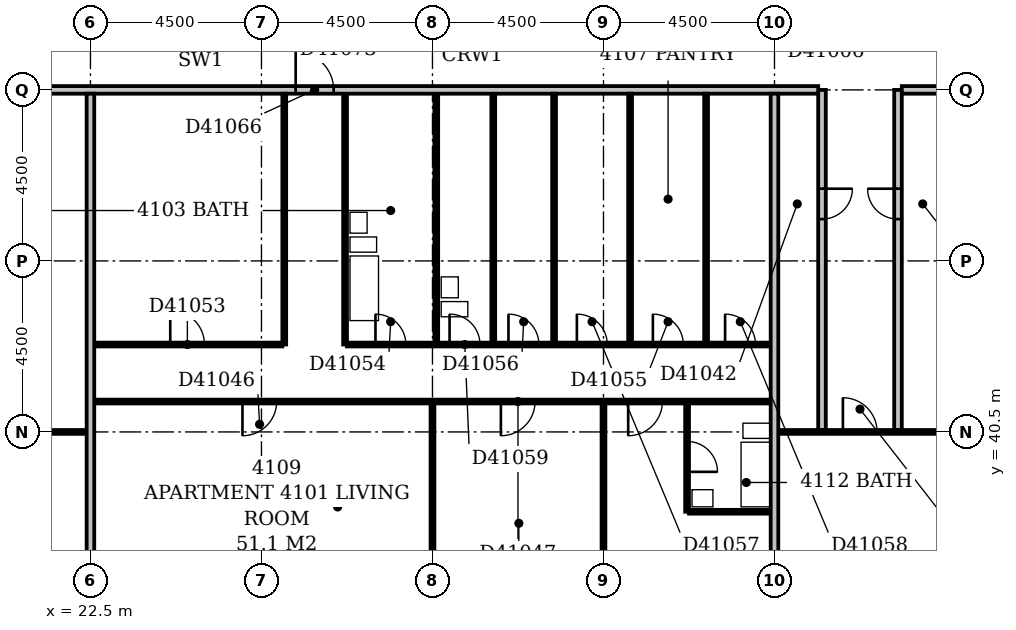
"""IFC4 building model, lengths in metres.
Left out: names, types, materials, properties, quantities, classifications, styles, units other than length and angle.
Written with IfcOpenShell. Run it as: python <this file> out.ifc"""

import sys

from ifc_helpers import new_model, si_unit, direction, frame, frame_2d, origin, place, context, subcontext, project, spatial, rectangle, extrude, element, fill, save


model = new_model("IFC4")
c1 = context("Model", 3, precision=1e-05, world=origin(), true_north=direction((0.0, 1.0)))
c2 = subcontext(c1, "Body", "Model", "MODEL_VIEW")
j1 = project(units=[si_unit("LENGTHUNIT", "METRE"), si_unit("PLANEANGLEUNIT", "RADIAN")], contexts=[c1])
p1 = place(None, origin())
s1 = spatial("IfcSite", under=j1, at=p1, CompositionType="ELEMENT")
p2 = place(p1, origin())
s2 = spatial("IfcBuilding", under=s1, at=p2, CompositionType="ELEMENT")
p3 = place(p2, frame((0.0, 0.0, 162.8)))
s3 = spatial("IfcBuildingStorey", under=s2, at=p3, CompositionType="ELEMENT", Elevation=162.8)
p4 = place(p3, frame((22.5, 36.5, 0.0), z_axis=(0.0, 0.0, 1.0), x_axis=(0.0, 1.0, 0.0)))
e1 = element("IfcWall", 1, at=p4, inside=s3, PredefinedType="PARTITIONING", context=c2, shape_type="SweptSolid", body=[
    extrude(rectangle(XDim=12.9, YDim=0.2, at=frame_2d((6.45, 0.0))), origin(), (0.0, 0.0, 1.0), 3.3),
])
p5 = place(p3, frame((31.5, 36.5, 0.0), z_axis=(0.0, 0.0, 1.0), x_axis=(0.0, 1.0, 0.0)))
e2 = element("IfcWall", 2, at=p5, inside=s3, PredefinedType="PARTITIONING", context=c2, shape_type="SweptSolid", body=[
    extrude(rectangle(XDim=4.75, YDim=0.1, at=frame_2d((2.375, 0.0))), origin(), (0.0, 0.0, 1.0), 3.3),
])
p6 = place(p3, frame((36.0, 36.5, 0.0), z_axis=(0.0, 0.0, 1.0), x_axis=(0.0, 1.0, 0.0)))
e3 = element("IfcWall", 3, at=p6, inside=s3, PredefinedType="PARTITIONING", context=c2, shape_type="SweptSolid", body=[
    extrude(rectangle(XDim=4.75, YDim=0.1, at=frame_2d((2.375, 0.0))), origin(), (0.0, 0.0, 1.0), 2.4),
])
p7 = place(p3, frame((40.5, 36.5, 0.0), z_axis=(0.0, 0.0, 1.0), x_axis=(0.0, 1.0, 0.0)))
e4 = element("IfcWall", 4, at=p7, inside=s3, PredefinedType="PARTITIONING", context=c2, shape_type="SweptSolid", body=[
    extrude(rectangle(XDim=12.9, YDim=0.2, at=frame_2d((6.45, 0.0))), origin(), (0.0, 0.0, 1.0), 3.3),
])
p8 = place(p3, frame((38.2, 38.4, 0.0), z_axis=(0.0, 0.0, 1.0), x_axis=(0.0, 1.0, 0.0)))
e5 = element("IfcWall", 5, at=p8, inside=s3, PredefinedType="PLUMBINGWALL", context=c2, shape_type="SweptSolid", body=[
    extrude(rectangle(XDim=2.85, YDim=0.1, at=frame_2d((1.425, 0.0))), origin(), (0.0, 0.0, 1.0), 3.3),
])
p9 = place(p8, frame((1.05, 0.0, 0.0)))
e6 = element("IfcOpeningElement", 6, at=p9, cuts=e5, PredefinedType="OPENING", context=c2, shape_type="SweptSolid", body=[
    extrude(rectangle(XDim=0.8, YDim=2.1, at=frame_2d((0.4, 1.05))), frame((0.0, 0.062, 0.0), z_axis=(0.0, -1.0, 0.0), x_axis=(1.0, 0.0, 0.0)), (0.0, 0.0, 1.0), 0.124),
])
p10 = place(p3, frame((38.25, 38.4, 0.0), z_axis=(0.0, 0.0, 1.0), x_axis=(1.0, 0.0, 0.0)))
e7 = element("IfcWall", 7, at=p10, inside=s3, PredefinedType="PLUMBINGWALL", context=c2, shape_type="SweptSolid", body=[
    extrude(rectangle(XDim=2.15, YDim=0.1, at=frame_2d((1.075, 0.0))), origin(), (0.0, 0.0, 1.0), 3.3),
])
p11 = place(p3, frame((9.1, 40.5, 0.0), z_axis=(0.0, 0.0, 1.0), x_axis=(1.0, 0.0, 0.0)))
e8 = element("IfcWall", 8, at=p11, inside=s3, PredefinedType="PARTITIONING", context=c2, shape_type="SweptSolid", body=[
    extrude(rectangle(XDim=13.3, YDim=0.1, at=frame_2d((6.65, 0.0))), origin(), (0.0, 0.0, 1.0), 3.3),
])
p12 = place(p3, frame((40.6, 40.5, 0.0), z_axis=(0.0, 0.0, 1.0), x_axis=(1.0, 0.0, 0.0)))
e9 = element("IfcWall", 9, at=p12, inside=s3, PredefinedType="PARTITIONING", context=c2, shape_type="SweptSolid", body=[
    extrude(rectangle(XDim=4.3, YDim=0.1, at=frame_2d((2.15, 0.0))), origin(), (0.0, 0.0, 1.0), 3.3),
])
p13 = place(p12, frame((1.7, 0.0, 0.0)))
e10 = element("IfcOpeningElement", 10, at=p13, cuts=e9, PredefinedType="OPENING", context=c2, shape_type="SweptSolid", body=[
    extrude(rectangle(XDim=0.9, YDim=2.1, at=frame_2d((0.45, 1.05))), frame((0.0, 0.062, 0.0), z_axis=(0.0, -1.0, 0.0), x_axis=(1.0, 0.0, 0.0)), (0.0, 0.0, 1.0), 0.124),
])
p14 = place(p3, frame((41.75, 40.55, 0.0), z_axis=(0.0, 0.0, 1.0), x_axis=(0.0, 1.0, 0.0)))
e11 = element("IfcWall", 11, at=p14, inside=s3, PredefinedType="PARTITIONING", context=c2, shape_type="SweptSolid", body=[
    extrude(rectangle(XDim=8.95, YDim=0.2, at=frame_2d((4.475, 0.0))), origin(), (0.0, 0.0, 1.0), 3.3),
])
p15 = place(p14, frame((5.55, 0.0, 0.0)))
e12 = element("IfcOpeningElement", 12, at=p15, cuts=e11, PredefinedType="OPENING", context=c2, shape_type="SweptSolid", body=[
    extrude(rectangle(XDim=0.8, YDim=2.1, at=frame_2d((0.4, 1.05))), frame((0.0, 0.112, 0.0), z_axis=(0.0, -1.0, 0.0), x_axis=(1.0, 0.0, 0.0)), (0.0, 0.0, 1.0), 0.224),
])
p16 = place(p3, frame((43.75, 40.55, 0.0), z_axis=(0.0, 0.0, 1.0), x_axis=(0.0, 1.0, 0.0)))
e13 = element("IfcWall", 13, at=p16, inside=s3, PredefinedType="PARTITIONING", context=c2, shape_type="SweptSolid", body=[
    extrude(rectangle(XDim=8.95, YDim=0.2, at=frame_2d((4.475, 0.0))), origin(), (0.0, 0.0, 1.0), 3.3),
])
p17 = place(p16, frame((5.55, 0.0, 0.0)))
e14 = element("IfcOpeningElement", 14, at=p17, cuts=e13, PredefinedType="OPENING", context=c2, shape_type="SweptSolid", body=[
    extrude(rectangle(XDim=0.8, YDim=2.1, at=frame_2d((0.4, 1.05))), frame((0.0, 0.112, 0.0), z_axis=(0.0, -1.0, 0.0), x_axis=(1.0, 0.0, 0.0)), (0.0, 0.0, 1.0), 0.224),
])
p18 = place(p3, frame((22.6, 41.3, 0.0), z_axis=(0.0, 0.0, 1.0), x_axis=(1.0, 0.0, 0.0)))
e15 = element("IfcWall", 15, at=p18, inside=s3, PredefinedType="PARTITIONING", context=c2, shape_type="SweptSolid", body=[
    extrude(rectangle(XDim=17.8, YDim=0.1, at=frame_2d((8.9, 0.0))), origin(), (0.0, 0.0, 1.0), 3.3),
])
p19 = place(p18, frame((3.9, 0.0, 0.0)))
e16 = element("IfcOpeningElement", 16, at=p19, cuts=e15, PredefinedType="OPENING", context=c2, shape_type="SweptSolid", body=[
    extrude(rectangle(XDim=0.9, YDim=2.1, at=frame_2d((0.45, 1.05))), frame((0.0, 0.062, 0.0), z_axis=(0.0, -1.0, 0.0), x_axis=(1.0, 0.0, 0.0)), (0.0, 0.0, 1.0), 0.124),
])
p20 = place(p18, frame((10.7, 0.0, 0.0)))
e17 = element("IfcOpeningElement", 17, at=p20, cuts=e15, PredefinedType="OPENING", context=c2, shape_type="SweptSolid", body=[
    extrude(rectangle(XDim=0.9, YDim=2.1, at=frame_2d((0.45, 1.05))), frame((0.0, 0.062, 0.0), z_axis=(0.0, -1.0, 0.0), x_axis=(1.0, 0.0, 0.0)), (0.0, 0.0, 1.0), 0.124),
])
p21 = place(p18, frame((14.05, 0.0, 0.0)))
e18 = element("IfcOpeningElement", 18, at=p21, cuts=e15, PredefinedType="OPENING", context=c2, shape_type="SweptSolid", body=[
    extrude(rectangle(XDim=0.9, YDim=2.1, at=frame_2d((0.45, 1.05))), frame((0.0, 0.062, 0.0), z_axis=(0.0, -1.0, 0.0), x_axis=(1.0, 0.0, 0.0)), (0.0, 0.0, 1.0), 0.124),
])
p22 = place(p3, frame((22.6, 42.8, 0.0), z_axis=(0.0, 0.0, 1.0), x_axis=(1.0, 0.0, 0.0)))
e19 = element("IfcWall", 19, at=p22, inside=s3, PredefinedType="PARTITIONING", context=c2, shape_type="SweptSolid", body=[
    extrude(rectangle(XDim=4.95, YDim=0.1, at=frame_2d((2.475, 0.0))), origin(), (0.0, 0.0, 1.0), 3.3),
])
p23 = place(p22, frame((2.0, 0.0, 0.0)))
e20 = element("IfcOpeningElement", 20, at=p23, cuts=e19, PredefinedType="OPENING", context=c2, shape_type="SweptSolid", body=[
    extrude(rectangle(XDim=0.9, YDim=2.1, at=frame_2d((0.45, 1.05))), frame((0.0, 0.062, 0.0), z_axis=(0.0, -1.0, 0.0), x_axis=(1.0, 0.0, 0.0)), (0.0, 0.0, 1.0), 0.124),
])
p24 = place(p3, frame((27.6, 42.8, 0.0), z_axis=(0.0, 0.0, 1.0), x_axis=(0.0, 1.0, 0.0)))
e21 = element("IfcWall", 21, at=p24, inside=s3, PredefinedType="PARTITIONING", context=c2, shape_type="SweptSolid", body=[
    extrude(rectangle(XDim=6.6, YDim=0.1, at=frame_2d((3.3, 0.0))), origin(), (0.0, 0.0, 1.0), 2.6),
])
p25 = place(p3, frame((29.2, 42.8, 0.0), z_axis=(0.0, 0.0, 1.0), x_axis=(0.0, 1.0, 0.0)))
e22 = element("IfcWall", 22, at=p25, inside=s3, PredefinedType="PLUMBINGWALL", context=c2, shape_type="SweptSolid", body=[
    extrude(rectangle(XDim=6.6, YDim=0.1, at=frame_2d((3.3, 0.0))), origin(), (0.0, 0.0, 1.0), 3.3),
])
p26 = place(p3, frame((29.25, 42.8, 0.0), z_axis=(0.0, 0.0, 1.0), x_axis=(1.0, 0.0, 0.0)))
e23 = element("IfcWall", 23, at=p26, inside=s3, PredefinedType="PARTITIONING", context=c2, shape_type="SweptSolid", body=[
    extrude(rectangle(XDim=11.15, YDim=0.1, at=frame_2d((5.575, 0.0))), origin(), (0.0, 0.0, 1.0), 3.3),
])
p27 = place(p26, frame((0.75, 0.0, 0.0)))
e24 = element("IfcOpeningElement", 24, at=p27, cuts=e23, PredefinedType="OPENING", context=c2, shape_type="SweptSolid", body=[
    extrude(rectangle(XDim=0.8, YDim=2.1, at=frame_2d((0.4, 1.05))), frame((0.0, 0.062, 0.0), z_axis=(0.0, -1.0, 0.0), x_axis=(1.0, 0.0, 0.0)), (0.0, 0.0, 1.0), 0.124),
])
p28 = place(p26, frame((8.05, 0.0, 0.0)))
e25 = element("IfcOpeningElement", 25, at=p28, cuts=e23, PredefinedType="OPENING", context=c2, shape_type="SweptSolid", body=[
    extrude(rectangle(XDim=0.8, YDim=2.1, at=frame_2d((0.4, 1.05))), frame((0.0, 0.062, 0.0), z_axis=(0.0, -1.0, 0.0), x_axis=(1.0, 0.0, 0.0)), (0.0, 0.0, 1.0), 0.124),
])
p29 = place(p26, frame((4.25, 0.0, 0.0)))
e26 = element("IfcOpeningElement", 26, at=p29, cuts=e23, PredefinedType="OPENING", context=c2, shape_type="SweptSolid", body=[
    extrude(rectangle(XDim=0.8, YDim=2.1, at=frame_2d((0.4, 1.05))), frame((0.0, 0.062, 0.0), z_axis=(0.0, -1.0, 0.0), x_axis=(1.0, 0.0, 0.0)), (0.0, 0.0, 1.0), 0.124),
])
p30 = place(p26, frame((6.05, 0.0, 0.0)))
e27 = element("IfcOpeningElement", 27, at=p30, cuts=e23, PredefinedType="OPENING", context=c2, shape_type="SweptSolid", body=[
    extrude(rectangle(XDim=0.8, YDim=2.1, at=frame_2d((0.4, 1.05))), frame((0.0, 0.062, 0.0), z_axis=(0.0, -1.0, 0.0), x_axis=(1.0, 0.0, 0.0)), (0.0, 0.0, 1.0), 0.124),
])
p31 = place(p26, frame((9.95, 0.0, 0.0)))
e28 = element("IfcOpeningElement", 28, at=p31, cuts=e23, PredefinedType="OPENING", context=c2, shape_type="SweptSolid", body=[
    extrude(rectangle(XDim=0.8, YDim=2.1, at=frame_2d((0.4, 1.05))), frame((0.0, 0.062, 0.0), z_axis=(0.0, -1.0, 0.0), x_axis=(1.0, 0.0, 0.0)), (0.0, 0.0, 1.0), 0.124),
])
p32 = place(p26, frame((2.7, 0.0, 0.0)))
e29 = element("IfcOpeningElement", 29, at=p32, cuts=e23, PredefinedType="OPENING", context=c2, shape_type="SweptSolid", body=[
    extrude(rectangle(XDim=0.8, YDim=2.1, at=frame_2d((0.4, 1.05))), frame((0.0, 0.062, 0.0), z_axis=(0.0, -1.0, 0.0), x_axis=(1.0, 0.0, 0.0)), (0.0, 0.0, 1.0), 0.124),
])
for number, where, z_axis, x_axis in (
    (30, (31.6, 42.85, 0.0), (0.0, 0.0, 1.0), (0.0, 1.0, 0.0)),
    (31, (33.1, 42.85, 0.0), (0.0, 0.0, 1.0), (0.0, 1.0, 0.0)),
):
    element("IfcWall", number, at=place(p3, frame(where, z_axis=z_axis, x_axis=x_axis)), inside=s3, PredefinedType="PLUMBINGWALL", context=c2, shape_type="SweptSolid", body=[
        extrude(rectangle(XDim=6.55, YDim=0.1, at=frame_2d((3.275, 0.0))), origin(), (0.0, 0.0, 1.0), 3.3),
    ])
p33 = place(p3, frame((34.7, 42.85, 0.0), z_axis=(0.0, 0.0, 1.0), x_axis=(0.0, 1.0, 0.0)))
e32 = element("IfcWall", 32, at=p33, inside=s3, PredefinedType="PARTITIONING", context=c2, shape_type="SweptSolid", body=[
    extrude(rectangle(XDim=6.55, YDim=0.1, at=frame_2d((3.275, 0.0))), origin(), (0.0, 0.0, 1.0), 3.3),
])
p34 = place(p3, frame((36.7, 42.85, 0.0), z_axis=(0.0, 0.0, 1.0), x_axis=(0.0, 1.0, 0.0)))
e33 = element("IfcWall", 33, at=p34, inside=s3, PredefinedType="PARTITIONING", context=c2, shape_type="SweptSolid", body=[
    extrude(rectangle(XDim=6.55, YDim=0.1, at=frame_2d((3.275, 0.0))), origin(), (0.0, 0.0, 1.0), 2.4),
])
p35 = place(p3, frame((38.7, 42.85, 0.0), z_axis=(0.0, 0.0, 1.0), x_axis=(0.0, 1.0, 0.0)))
e34 = element("IfcWall", 34, at=p35, inside=s3, PredefinedType="PARTITIONING", context=c2, shape_type="SweptSolid", body=[
    extrude(rectangle(XDim=6.55, YDim=0.1, at=frame_2d((3.275, 0.0))), origin(), (0.0, 0.0, 1.0), 3.3),
])
p36 = place(p3, frame((9.1, 49.5, 0.0), z_axis=(0.0, 0.0, 1.0), x_axis=(1.0, 0.0, 0.0)))
e35 = element("IfcWall", 35, at=p36, inside=s3, PredefinedType="PARTITIONING", context=c2, shape_type="SweptSolid", body=[
    extrude(rectangle(XDim=32.55, YDim=0.2, at=frame_2d((16.275, 0.0))), origin(), (0.0, 0.0, 1.0), 3.3),
])
p37 = place(p36, frame((18.8, 0.0, 0.0)))
e36 = element("IfcOpeningElement", 36, at=p37, cuts=e35, PredefinedType="OPENING", context=c2, shape_type="SweptSolid", body=[
    extrude(rectangle(XDim=1.0, YDim=2.1, at=frame_2d((0.5, 1.05))), frame((0.0, 0.112, 0.0), z_axis=(0.0, -1.0, 0.0), x_axis=(1.0, 0.0, 0.0)), (0.0, 0.0, 1.0), 0.224),
])
p38 = place(p36, frame((6.15, 0.0, 0.0)))
e37 = element("IfcOpeningElement", 37, at=p38, cuts=e35, PredefinedType="OPENING", context=c2, shape_type="SweptSolid", body=[
    extrude(rectangle(XDim=0.9, YDim=2.1, at=frame_2d((0.45, 1.05))), frame((0.0, 0.112, 0.0), z_axis=(0.0, -1.0, 0.0), x_axis=(1.0, 0.0, 0.0)), (0.0, 0.0, 1.0), 0.224),
])
p39 = place(p3, frame((43.85, 49.5, 0.0), z_axis=(0.0, 0.0, 1.0), x_axis=(1.0, 0.0, 0.0)))
e38 = element("IfcWall", 38, at=p39, inside=s3, PredefinedType="PARTITIONING", context=c2, shape_type="SweptSolid", body=[
    extrude(rectangle(XDim=15.8, YDim=0.2, at=frame_2d((7.9, 0.0))), origin(), (0.0, 0.0, 1.0), 3.3),
])
p40 = place(p39, frame((1.45, 0.0, 0.0)))
e39 = element("IfcOpeningElement", 39, at=p40, cuts=e38, PredefinedType="OPENING", context=c2, shape_type="SweptSolid", body=[
    extrude(rectangle(XDim=1.0, YDim=2.1, at=frame_2d((0.5, 1.05))), frame((0.0, 0.112, 0.0), z_axis=(0.0, -1.0, 0.0), x_axis=(1.0, 0.0, 0.0)), (0.0, 0.0, 1.0), 0.224),
])
p41 = place(p9, frame((0.8, 0.0, 0.0), z_axis=(0.0, 0.0, 1.0), x_axis=(-1.0, 0.0, 0.0)))
e40 = element("IfcDoor", 40, at=p41, inside=s3, OperationType="SINGLE_SWING_RIGHT", PredefinedType="DOOR", context=c2, shape_type="SweptSolid", body=[
    extrude(rectangle(XDim=0.8, YDim=2.1, at=frame_2d((0.4, 1.05))), frame((0.0, 0.025, 0.0), z_axis=(0.0, -1.0, 0.0), x_axis=(1.0, 0.0, 0.0)), (0.0, 0.0, 1.0), 0.05),
])
fill(e6, e40)
p42 = place(p13, origin())
e41 = element("IfcDoor", 41, at=p42, inside=s3, OperationType="SINGLE_SWING_LEFT", PredefinedType="DOOR", context=c2, shape_type="SweptSolid", body=[
    extrude(rectangle(XDim=0.9, YDim=2.1, at=frame_2d((0.45, 1.05))), frame((0.0, 0.025, 0.0), z_axis=(0.0, -1.0, 0.0), x_axis=(1.0, 0.0, 0.0)), (0.0, 0.0, 1.0), 0.05),
])
fill(e10, e41)
p43 = place(p15, origin())
e42 = element("IfcDoor", 42, at=p43, inside=s3, OperationType="SINGLE_SWING_RIGHT", PredefinedType="DOOR", context=c2, shape_type="SweptSolid", body=[
    extrude(rectangle(XDim=0.8, YDim=2.1, at=frame_2d((0.4, 1.05))), frame((0.0, 0.025, 0.0), z_axis=(0.0, -1.0, 0.0), x_axis=(1.0, 0.0, 0.0)), (0.0, 0.0, 1.0), 0.05),
])
fill(e12, e42)
p44 = place(p17, frame((0.8, 0.0, 0.0), z_axis=(0.0, 0.0, 1.0), x_axis=(-1.0, 0.0, 0.0)))
e43 = element("IfcDoor", 43, at=p44, inside=s3, OperationType="SINGLE_SWING_LEFT", PredefinedType="DOOR", context=c2, shape_type="SweptSolid", body=[
    extrude(rectangle(XDim=0.8, YDim=2.1, at=frame_2d((0.4, 1.05))), frame((0.0, 0.025, 0.0), z_axis=(0.0, -1.0, 0.0), x_axis=(1.0, 0.0, 0.0)), (0.0, 0.0, 1.0), 0.05),
])
fill(e14, e43)
p45 = place(p19, frame((0.9, 0.0, 0.0), z_axis=(0.0, 0.0, 1.0), x_axis=(-1.0, 0.0, 0.0)))
e44 = element("IfcDoor", 44, at=p45, inside=s3, OperationType="SINGLE_SWING_RIGHT", PredefinedType="DOOR", context=c2, shape_type="SweptSolid", body=[
    extrude(rectangle(XDim=0.9, YDim=2.1, at=frame_2d((0.45, 1.05))), frame((0.0, 0.025, 0.0), z_axis=(0.0, -1.0, 0.0), x_axis=(1.0, 0.0, 0.0)), (0.0, 0.0, 1.0), 0.05),
])
fill(e16, e44)
p46 = place(p20, frame((0.9, 0.0, 0.0), z_axis=(0.0, 0.0, 1.0), x_axis=(-1.0, 0.0, 0.0)))
e45 = element("IfcDoor", 45, at=p46, inside=s3, OperationType="SINGLE_SWING_RIGHT", PredefinedType="DOOR", context=c2, shape_type="SweptSolid", body=[
    extrude(rectangle(XDim=0.9, YDim=2.1, at=frame_2d((0.45, 1.05))), frame((0.0, 0.025, 0.0), z_axis=(0.0, -1.0, 0.0), x_axis=(1.0, 0.0, 0.0)), (0.0, 0.0, 1.0), 0.05),
])
fill(e17, e45)
p47 = place(p21, frame((0.9, 0.0, 0.0), z_axis=(0.0, 0.0, 1.0), x_axis=(-1.0, 0.0, 0.0)))
e46 = element("IfcDoor", 46, at=p47, inside=s3, OperationType="SINGLE_SWING_RIGHT", PredefinedType="DOOR", context=c2, shape_type="SweptSolid", body=[
    extrude(rectangle(XDim=0.9, YDim=2.1, at=frame_2d((0.45, 1.05))), frame((0.0, 0.025, 0.0), z_axis=(0.0, -1.0, 0.0), x_axis=(1.0, 0.0, 0.0)), (0.0, 0.0, 1.0), 0.05),
])
fill(e18, e46)
p48 = place(p23, origin())
e47 = element("IfcDoor", 47, at=p48, inside=s3, OperationType="SINGLE_SWING_LEFT", PredefinedType="DOOR", context=c2, shape_type="SweptSolid", body=[
    extrude(rectangle(XDim=0.9, YDim=2.1, at=frame_2d((0.45, 1.05))), frame((0.0, 0.025, 0.0), z_axis=(0.0, -1.0, 0.0), x_axis=(1.0, 0.0, 0.0)), (0.0, 0.0, 1.0), 0.05),
])
fill(e20, e47)
p49 = place(p27, origin())
e48 = element("IfcDoor", 48, at=p49, inside=s3, OperationType="SINGLE_SWING_LEFT", PredefinedType="DOOR", context=c2, shape_type="SweptSolid", body=[
    extrude(rectangle(XDim=0.8, YDim=2.1, at=frame_2d((0.4, 1.05))), frame((0.0, 0.025, 0.0), z_axis=(0.0, -1.0, 0.0), x_axis=(1.0, 0.0, 0.0)), (0.0, 0.0, 1.0), 0.05),
])
fill(e24, e48)
p50 = place(p28, origin())
e49 = element("IfcDoor", 49, at=p50, inside=s3, OperationType="SINGLE_SWING_LEFT", PredefinedType="DOOR", context=c2, shape_type="SweptSolid", body=[
    extrude(rectangle(XDim=0.8, YDim=2.1, at=frame_2d((0.4, 1.05))), frame((0.0, 0.025, 0.0), z_axis=(0.0, -1.0, 0.0), x_axis=(1.0, 0.0, 0.0)), (0.0, 0.0, 1.0), 0.05),
])
fill(e25, e49)
p51 = place(p29, origin())
e50 = element("IfcDoor", 50, at=p51, inside=s3, OperationType="SINGLE_SWING_LEFT", PredefinedType="DOOR", context=c2, shape_type="SweptSolid", body=[
    extrude(rectangle(XDim=0.8, YDim=2.1, at=frame_2d((0.4, 1.05))), frame((0.0, 0.025, 0.0), z_axis=(0.0, -1.0, 0.0), x_axis=(1.0, 0.0, 0.0)), (0.0, 0.0, 1.0), 0.05),
])
fill(e26, e50)
p52 = place(p30, origin())
e51 = element("IfcDoor", 51, at=p52, inside=s3, OperationType="SINGLE_SWING_LEFT", PredefinedType="DOOR", context=c2, shape_type="SweptSolid", body=[
    extrude(rectangle(XDim=0.8, YDim=2.1, at=frame_2d((0.4, 1.05))), frame((0.0, 0.025, 0.0), z_axis=(0.0, -1.0, 0.0), x_axis=(1.0, 0.0, 0.0)), (0.0, 0.0, 1.0), 0.05),
])
fill(e27, e51)
p53 = place(p31, origin())
e52 = element("IfcDoor", 52, at=p53, inside=s3, OperationType="SINGLE_SWING_LEFT", PredefinedType="DOOR", context=c2, shape_type="SweptSolid", body=[
    extrude(rectangle(XDim=0.8, YDim=2.1, at=frame_2d((0.4, 1.05))), frame((0.0, 0.025, 0.0), z_axis=(0.0, -1.0, 0.0), x_axis=(1.0, 0.0, 0.0)), (0.0, 0.0, 1.0), 0.05),
])
fill(e28, e52)
p54 = place(p32, origin())
e53 = element("IfcDoor", 53, at=p54, inside=s3, OperationType="SINGLE_SWING_LEFT", PredefinedType="DOOR", context=c2, shape_type="SweptSolid", body=[
    extrude(rectangle(XDim=0.8, YDim=2.1, at=frame_2d((0.4, 1.05))), frame((0.0, 0.025, 0.0), z_axis=(0.0, -1.0, 0.0), x_axis=(1.0, 0.0, 0.0)), (0.0, 0.0, 1.0), 0.05),
])
fill(e29, e53)
p55 = place(p37, origin())
e54 = element("IfcDoor", 54, at=p55, inside=s3, OperationType="SINGLE_SWING_LEFT", PredefinedType="DOOR", context=c2, shape_type="SweptSolid", body=[
    extrude(rectangle(XDim=1.0, YDim=2.1, at=frame_2d((0.5, 1.05))), frame((0.0, 0.025, 0.0), z_axis=(0.0, -1.0, 0.0), x_axis=(1.0, 0.0, 0.0)), (0.0, 0.0, 1.0), 0.05),
])
fill(e36, e54)
save(model, sys.argv[1])
